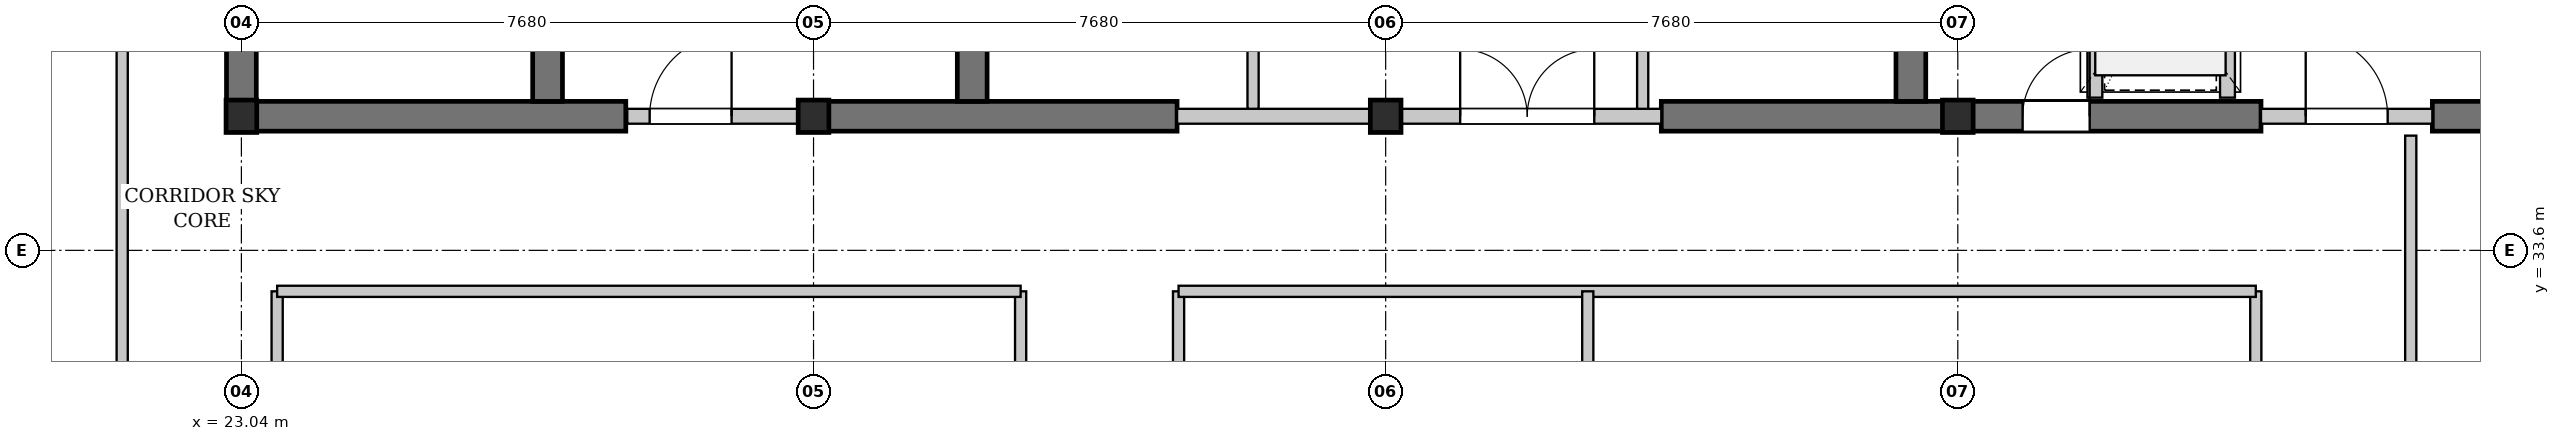
"""IFC4 building model, lengths in metres.
Left out: names, types, materials, properties, quantities, classifications, styles, units other than length and angle.
Written with IfcOpenShell. Run it as: python <this file> out.ifc"""

import sys

from ifc_helpers import new_model, si_unit, direction, frame, frame_2d, origin, origin_2d, place, context, subcontext, project, spatial, rectangle, i_section, extrude, element, fill, save


model = new_model("IFC4")
c1 = context("Model", 3, precision=1e-05, world=origin(), true_north=direction((0.0, 1.0)))
c2 = subcontext(c1, "Body", "Model", "MODEL_VIEW")
j1 = project(units=[si_unit("LENGTHUNIT", "METRE"), si_unit("PLANEANGLEUNIT", "RADIAN")], contexts=[c1])
p1 = place(None, origin())
s1 = spatial("IfcSite", under=j1, at=p1, CompositionType="ELEMENT")
p2 = place(p1, origin())
s2 = spatial("IfcBuilding", under=s1, at=p2, CompositionType="ELEMENT")
p3 = place(p2, frame((0.0, 0.0, 221.0)))
s3 = spatial("IfcBuildingStorey", under=s2, at=p3, CompositionType="ELEMENT", Elevation=221.0)
p4 = place(p3, frame((22.84, 35.4, 0.0), z_axis=(0.0, 0.0, 1.0), x_axis=(1.0, 0.0, 0.0)))
e1 = element("IfcWall", 1, at=p4, inside=s3, PredefinedType="SHEAR", context=c2, shape_type="SweptSolid", body=[
    extrude(rectangle(XDim=5.36, YDim=0.4, at=frame_2d((2.68, 0.0))), origin(), (0.0, 0.0, 1.0), 3.08),
])
p5 = place(p3, frame((30.72, 35.4, 0.0), z_axis=(0.0, 0.0, 1.0), x_axis=(1.0, 0.0, 0.0)))
e2 = element("IfcWall", 2, at=p5, inside=s3, PredefinedType="SHEAR", context=c2, shape_type="SweptSolid", body=[
    extrude(rectangle(XDim=4.88, YDim=0.4, at=frame_2d((2.44, 0.0))), origin(), (0.0, 0.0, 1.0), 3.08),
])
p6 = place(p3, frame((42.1, 35.4, 0.0), z_axis=(0.0, 0.0, 1.0), x_axis=(1.0, 0.0, 0.0)))
e3 = element("IfcWall", 3, at=p6, inside=s3, PredefinedType="SHEAR", context=c2, shape_type="SweptSolid", body=[
    extrude(rectangle(XDim=8.05, YDim=0.4, at=frame_2d((4.025, 0.0))), origin(), (0.0, 0.0, 1.0), 3.08),
])
p7 = place(p6, frame((4.85, 0.0, 0.0)))
e4 = element("IfcOpeningElement", 4, at=p7, cuts=e3, PredefinedType="OPENING", context=c2, shape_type="SweptSolid", body=[
    extrude(rectangle(XDim=0.9, YDim=2.15, at=frame_2d((0.45, 1.075))), frame((0.0, 0.21, 0.0), z_axis=(0.0, -1.0, 0.0), x_axis=(1.0, 0.0, 0.0)), (0.0, 0.0, 1.0), 0.42),
])
p8 = place(p3, frame((52.45, 35.4, 0.0), z_axis=(0.0, 0.0, 1.0), x_axis=(1.0, 0.0, 0.0)))
e5 = element("IfcWall", 5, at=p8, inside=s3, PredefinedType="SHEAR", context=c2, shape_type="SweptSolid", body=[
    extrude(rectangle(XDim=1.51, YDim=0.4, at=frame_2d((0.755, 0.0))), origin(), (0.0, 0.0, 1.0), 3.08),
])
p9 = place(p3, frame((23.04, 35.6, 0.0), z_axis=(0.0, 0.0, 1.0), x_axis=(0.0, 1.0, 0.0)))
e6 = element("IfcWall", 6, at=p9, inside=s3, PredefinedType="SHEAR", context=c2, shape_type="SweptSolid", body=[
    extrude(rectangle(XDim=10.4, YDim=0.4, at=frame_2d((5.2, 0.0))), origin(), (0.0, 0.0, 1.0), 3.08),
])
p10 = place(p3, frame((27.15, 35.6, 0.0), z_axis=(0.0, 0.0, 1.0), x_axis=(0.0, 1.0, 0.0)))
e7 = element("IfcWall", 7, at=p10, inside=s3, PredefinedType="SHEAR", context=c2, shape_type="SweptSolid", body=[
    extrude(rectangle(XDim=10.4, YDim=0.4, at=frame_2d((5.2, 0.0))), origin(), (0.0, 0.0, 1.0), 3.08),
])
p11 = place(p10, frame((0.7, 0.0, 0.0)))
e8 = element("IfcOpeningElement", 8, at=p11, cuts=e7, PredefinedType="OPENING", context=c2, shape_type="SweptSolid", body=[
    extrude(rectangle(XDim=1.1, YDim=2.15, at=frame_2d((0.55, 1.075))), frame((0.0, 0.21, 0.0), z_axis=(0.0, -1.0, 0.0), x_axis=(1.0, 0.0, 0.0)), (0.0, 0.0, 1.0), 0.42),
])
for number, where, z_axis, x_axis in (
    (9, (32.85, 35.6, 0.0), (0.0, 0.0, 1.0), (0.0, 1.0, 0.0)),
    (10, (45.45, 35.6, 0.0), (0.0, 0.0, 1.0), (0.0, 1.0, 0.0)),
):
    element("IfcWall", number, at=place(p3, frame(where, z_axis=z_axis, x_axis=x_axis)), inside=s3, PredefinedType="SHEAR", context=c2, shape_type="SweptSolid", body=[
        extrude(rectangle(XDim=10.4, YDim=0.4, at=frame_2d((5.2, 0.0))), origin(), (0.0, 0.0, 1.0), 3.08),
    ])
for number, where, z_axis, x_axis in (
    (11, (23.04, 35.4, 0.0), (0.0, 0.0, 1.0), (1.0, 0.0, 0.0)),
    (12, (30.72, 35.4, 0.0), (0.0, 0.0, 1.0), (1.0, 0.0, 0.0)),
    (13, (38.4, 35.4, 0.0), (0.0, 0.0, 1.0), (1.0, 0.0, 0.0)),
    (14, (46.08, 35.4, 0.0), (0.0, 0.0, 1.0), (1.0, 0.0, 0.0)),
):
    element("IfcColumn", number, at=place(p3, frame(where, z_axis=z_axis, x_axis=x_axis)), inside=s3, PredefinedType="COLUMN", context=c2, shape_type="SweptSolid", body=[
        extrude(i_section(OverallWidth=0.412, OverallDepth=0.435, WebThickness=0.036, FlangeThickness=0.058, FilletRadius=0.015, at=origin_2d()), origin(), (0.0, 0.0, 1.0), 3.3),
    ])
p12 = place(p3, frame((28.22, 35.4, 0.0), z_axis=(0.0, 0.0, 1.0), x_axis=(1.0, 0.0, 0.0)))
e15 = element("IfcWall", 15, at=p12, inside=s3, PredefinedType="PARTITIONING", context=c2, shape_type="SweptSolid", body=[
    extrude(rectangle(XDim=2.5, YDim=0.2, at=frame_2d((1.25, 0.0))), origin(), (0.0, 0.0, 1.0), 2.313),
])
p13 = place(p12, frame((0.3, 0.0, 0.0)))
e16 = element("IfcOpeningElement", 16, at=p13, cuts=e15, PredefinedType="OPENING", context=c2, shape_type="SweptSolid", body=[
    extrude(rectangle(XDim=1.1, YDim=2.15, at=frame_2d((0.55, 1.075))), frame((0.0, 0.11, 0.0), z_axis=(0.0, -1.0, 0.0), x_axis=(1.0, 0.0, 0.0)), (0.0, 0.0, 1.0), 0.22),
])
p14 = place(p3, frame((35.6, 35.4, 0.0), z_axis=(0.0, 0.0, 1.0), x_axis=(1.0, 0.0, 0.0)))
e17 = element("IfcWall", 17, at=p14, inside=s3, PredefinedType="PARTITIONING", context=c2, shape_type="SweptSolid", body=[
    extrude(rectangle(XDim=6.5, YDim=0.2, at=frame_2d((3.25, 0.0))), origin(), (0.0, 0.0, 1.0), 2.313),
])
p15 = place(p14, frame((3.8, 0.0, 0.0)))
e18 = element("IfcOpeningElement", 18, at=p15, cuts=e17, PredefinedType="OPENING", context=c2, shape_type="SweptSolid", body=[
    extrude(rectangle(XDim=1.8, YDim=2.3, at=frame_2d((0.9, 1.15))), frame((0.0, 0.11, 0.0), z_axis=(0.0, -1.0, 0.0), x_axis=(1.0, 0.0, 0.0)), (0.0, 0.0, 1.0), 0.22),
])
p16 = place(p3, frame((36.62, 35.5, 0.0), z_axis=(0.0, 0.0, 1.0), x_axis=(0.0, 1.0, 0.0)))
e19 = element("IfcWall", 19, at=p16, inside=s3, PredefinedType="PARTITIONING", context=c2, shape_type="SweptSolid", body=[
    extrude(rectangle(XDim=10.42, YDim=0.15, at=frame_2d((5.21, 0.0))), origin(), (0.0, 0.0, 1.0), 3.08),
])
p17 = place(p16, frame((3.92, 0.0, 0.0)))
e20 = element("IfcOpeningElement", 20, at=p17, cuts=e19, PredefinedType="OPENING", context=c2, shape_type="SweptSolid", body=[
    extrude(rectangle(XDim=0.9, YDim=2.15, at=frame_2d((0.45, 1.075))), frame((0.0, 0.085, 0.0), z_axis=(0.0, -1.0, 0.0), x_axis=(1.0, 0.0, 0.0)), (0.0, 0.0, 1.0), 0.17),
])
p18 = place(p16, frame((5.85, 0.0, 0.0)))
e21 = element("IfcOpeningElement", 21, at=p18, cuts=e19, PredefinedType="OPENING", context=c2, shape_type="SweptSolid", body=[
    extrude(rectangle(XDim=0.9, YDim=2.15, at=frame_2d((0.45, 1.075))), frame((0.0, 0.085, 0.0), z_axis=(0.0, -1.0, 0.0), x_axis=(1.0, 0.0, 0.0)), (0.0, 0.0, 1.0), 0.17),
])
p19 = place(p3, frame((41.85, 35.5, 0.0), z_axis=(0.0, 0.0, 1.0), x_axis=(0.0, 1.0, 0.0)))
e22 = element("IfcWall", 22, at=p19, inside=s3, PredefinedType="PARTITIONING", context=c2, shape_type="SweptSolid", body=[
    extrude(rectangle(XDim=10.42, YDim=0.15, at=frame_2d((5.21, 0.0))), origin(), (0.0, 0.0, 1.0), 3.08),
])
p20 = place(p19, frame((3.92, 0.0, 0.0)))
e23 = element("IfcOpeningElement", 23, at=p20, cuts=e22, PredefinedType="OPENING", context=c2, shape_type="SweptSolid", body=[
    extrude(rectangle(XDim=0.9, YDim=2.15, at=frame_2d((0.45, 1.075))), frame((0.0, 0.085, 0.0), z_axis=(0.0, -1.0, 0.0), x_axis=(1.0, 0.0, 0.0)), (0.0, 0.0, 1.0), 0.17),
])
p21 = place(p19, frame((5.85, 0.0, 0.0)))
e24 = element("IfcOpeningElement", 24, at=p21, cuts=e22, PredefinedType="OPENING", context=c2, shape_type="SweptSolid", body=[
    extrude(rectangle(XDim=0.9, YDim=2.15, at=frame_2d((0.45, 1.075))), frame((0.0, 0.085, 0.0), z_axis=(0.0, -1.0, 0.0), x_axis=(1.0, 0.0, 0.0)), (0.0, 0.0, 1.0), 0.17),
])
p22 = place(p3, frame((50.15, 35.4, 0.0), z_axis=(0.0, 0.0, 1.0), x_axis=(1.0, 0.0, 0.0)))
e25 = element("IfcWall", 25, at=p22, inside=s3, PredefinedType="PARTITIONING", context=c2, shape_type="SweptSolid", body=[
    extrude(rectangle(XDim=2.3, YDim=0.2, at=frame_2d((1.15, 0.0))), origin(), (0.0, 0.0, 1.0), 2.313),
])
p23 = place(p22, frame((0.6, 0.0, 0.0)))
e26 = element("IfcOpeningElement", 26, at=p23, cuts=e25, PredefinedType="OPENING", context=c2, shape_type="SweptSolid", body=[
    extrude(rectangle(XDim=1.1, YDim=2.15, at=frame_2d((0.55, 1.075))), frame((0.0, 0.11, 0.0), z_axis=(0.0, -1.0, 0.0), x_axis=(1.0, 0.0, 0.0)), (0.0, 0.0, 1.0), 0.22),
])
p24 = place(p3, frame((49.7, 35.65, 0.0), z_axis=(0.0, 0.0, 1.0), x_axis=(0.0, 1.0, 0.0)))
e27 = element("IfcWall", 27, at=p24, inside=s3, PredefinedType="PARTITIONING", context=c2, shape_type="SweptSolid", body=[
    extrude(rectangle(XDim=3.15, YDim=0.2, at=frame_2d((1.575, 0.0))), origin(), (0.0, 0.0, 1.0), 3.08),
])
p25 = place(p24, frame((0.85, 0.0, 0.0)))
e28 = element("IfcOpeningElement", 28, at=p25, cuts=e27, PredefinedType="OPENING", context=c2, shape_type="SweptSolid", body=[
    extrude(rectangle(XDim=1.2, YDim=2.2, at=frame_2d((0.6, 1.1))), frame((0.0, 0.11, 0.0), z_axis=(0.0, -1.0, 0.0), x_axis=(1.0, 0.0, 0.0)), (0.0, 0.0, 1.0), 0.22),
])
p26 = place(p3, frame((47.92, 35.65, 0.0), z_axis=(0.0, 0.0, 1.0), x_axis=(0.0, 1.0, 0.0)))
e29 = element("IfcWall", 29, at=p26, inside=s3, PredefinedType="PARTITIONING", context=c2, shape_type="SweptSolid", body=[
    extrude(rectangle(XDim=3.15, YDim=0.2, at=frame_2d((1.575, 0.0))), origin(), (0.0, 0.0, 1.0), 3.08),
])
p27 = place(p3, frame((21.44, 23.85, 0.0), z_axis=(0.0, 0.0, 1.0), x_axis=(0.0, 1.0, 0.0)))
e30 = element("IfcWall", 30, at=p27, inside=s3, PredefinedType="PARTITIONING", context=c2, shape_type="SweptSolid", body=[
    extrude(rectangle(XDim=22.498, YDim=0.15, at=frame_2d((11.249, 0.0))), origin(), (0.0, 0.0, 1.0), 3.08),
])
p28 = place(p27, frame((0.3, 0.0, 0.0)))
e31 = element("IfcOpeningElement", 31, at=p28, cuts=e30, PredefinedType="OPENING", context=c2, shape_type="SweptSolid", body=[
    extrude(rectangle(XDim=0.9, YDim=2.15, at=frame_2d((0.45, 1.075))), frame((0.0, 0.085, 0.0), z_axis=(0.0, -1.0, 0.0), x_axis=(1.0, 0.0, 0.0)), (0.0, 0.0, 1.0), 0.17),
])
p29 = place(p3, frame((52.16, 23.85, 0.0), z_axis=(0.0, 0.0, 1.0), x_axis=(0.0, 1.0, 0.0)))
e32 = element("IfcWall", 32, at=p29, inside=s3, PredefinedType="PARTITIONING", context=c2, shape_type="SweptSolid", body=[
    extrude(rectangle(XDim=11.29, YDim=0.15, at=frame_2d((5.645, 0.0))), origin(), (0.0, 0.0, 1.0), 3.08),
])
p30 = place(p29, frame((0.3, 0.0, 0.0)))
e33 = element("IfcOpeningElement", 33, at=p30, cuts=e32, PredefinedType="OPENING", context=c2, shape_type="SweptSolid", body=[
    extrude(rectangle(XDim=0.9, YDim=2.15, at=frame_2d((0.45, 1.075))), frame((0.0, 0.085, 0.0), z_axis=(0.0, -1.0, 0.0), x_axis=(1.0, 0.0, 0.0)), (0.0, 0.0, 1.0), 0.17),
])
for number, where, z_axis, x_axis in (
    (34, (23.52, 25.93, 0.0), (0.0, 0.0, 1.0), (0.0, 1.0, 0.0)),
    (35, (50.08, 25.93, 0.0), (0.0, 0.0, 1.0), (0.0, 1.0, 0.0)),
    (36, (33.5, 25.93, 0.0), (0.0, 0.0, 1.0), (0.0, 1.0, 0.0)),
    (37, (35.62, 25.93, 0.0), (0.0, 0.0, 1.0), (0.0, 1.0, 0.0)),
):
    element("IfcWall", number, at=place(p3, frame(where, z_axis=z_axis, x_axis=x_axis)), inside=s3, PredefinedType="PARTITIONING", context=c2, shape_type="SweptSolid", body=[
        extrude(rectangle(XDim=7.12, YDim=0.15, at=frame_2d((3.56, 0.0))), origin(), (0.0, 0.0, 1.0), 3.08),
    ])
p31 = place(p3, frame((23.52, 33.05, 0.0), z_axis=(0.0, 0.0, 1.0), x_axis=(1.0, 0.0, 0.0)))
e38 = element("IfcWall", 38, at=p31, inside=s3, PredefinedType="PARTITIONING", context=c2, shape_type="SweptSolid", body=[
    extrude(rectangle(XDim=9.98, YDim=0.15, at=frame_2d((4.99, 0.0))), origin(), (0.0, 0.0, 1.0), 3.08),
])
p32 = place(p3, frame((35.62, 33.05, 0.0), z_axis=(0.0, 0.0, 1.0), x_axis=(1.0, 0.0, 0.0)))
e39 = element("IfcWall", 39, at=p32, inside=s3, PredefinedType="PARTITIONING", context=c2, shape_type="SweptSolid", body=[
    extrude(rectangle(XDim=14.46, YDim=0.15, at=frame_2d((7.23, 0.0))), origin(), (0.0, 0.0, 1.0), 3.08),
])
p33 = place(p3, frame((41.113, 25.93, 0.0), z_axis=(0.0, 0.0, 1.0), x_axis=(0.0, 1.0, 0.0)))
e40 = element("IfcWall", 40, at=p33, inside=s3, PredefinedType="PARTITIONING", context=c2, shape_type="SweptSolid", body=[
    extrude(rectangle(XDim=7.12, YDim=0.15, at=frame_2d((3.56, 0.0))), origin(), (0.0, 0.0, 1.0), 3.08),
])
p34 = place(p13, origin())
e41 = element("IfcDoor", 41, at=p34, inside=s3, OperationType="SINGLE_SWING_RIGHT", PredefinedType="DOOR", context=c2, shape_type="SweptSolid", body=[
    extrude(rectangle(XDim=1.1, YDim=2.15, at=frame_2d((0.55, 1.075))), frame((0.0, 0.025, 0.0), z_axis=(0.0, -1.0, 0.0), x_axis=(1.0, 0.0, 0.0)), (0.0, 0.0, 1.0), 0.05),
])
fill(e16, e41)
p35 = place(p15, origin())
e42 = element("IfcDoor", 42, at=p35, inside=s3, OperationType="DOUBLE_DOOR_SINGLE_SWING", PredefinedType="DOOR", context=c2, shape_type="SweptSolid", body=[
    extrude(rectangle(XDim=1.8, YDim=2.3, at=frame_2d((0.9, 1.15))), frame((0.0, 0.025, 0.0), z_axis=(0.0, -1.0, 0.0), x_axis=(1.0, 0.0, 0.0)), (0.0, 0.0, 1.0), 0.05),
])
fill(e18, e42)
p36 = place(p23, origin())
e43 = element("IfcDoor", 43, at=p36, inside=s3, OperationType="SINGLE_SWING_LEFT", PredefinedType="DOOR", context=c2, shape_type="SweptSolid", body=[
    extrude(rectangle(XDim=1.1, YDim=2.15, at=frame_2d((0.55, 1.075))), frame((0.0, 0.025, 0.0), z_axis=(0.0, -1.0, 0.0), x_axis=(1.0, 0.0, 0.0)), (0.0, 0.0, 1.0), 0.05),
])
fill(e26, e43)
p37 = place(p7, origin())
e44 = element("IfcDoor", 44, at=p37, inside=s3, OperationType="SINGLE_SWING_RIGHT", PredefinedType="DOOR", context=c2, shape_type="SweptSolid", body=[
    extrude(rectangle(XDim=0.9, YDim=2.15, at=frame_2d((0.45, 1.075))), frame((0.0, 0.025, 0.0), z_axis=(0.0, -1.0, 0.0), x_axis=(1.0, 0.0, 0.0)), (0.0, 0.0, 1.0), 0.05),
])
fill(e4, e44)
save(model, sys.argv[1])
